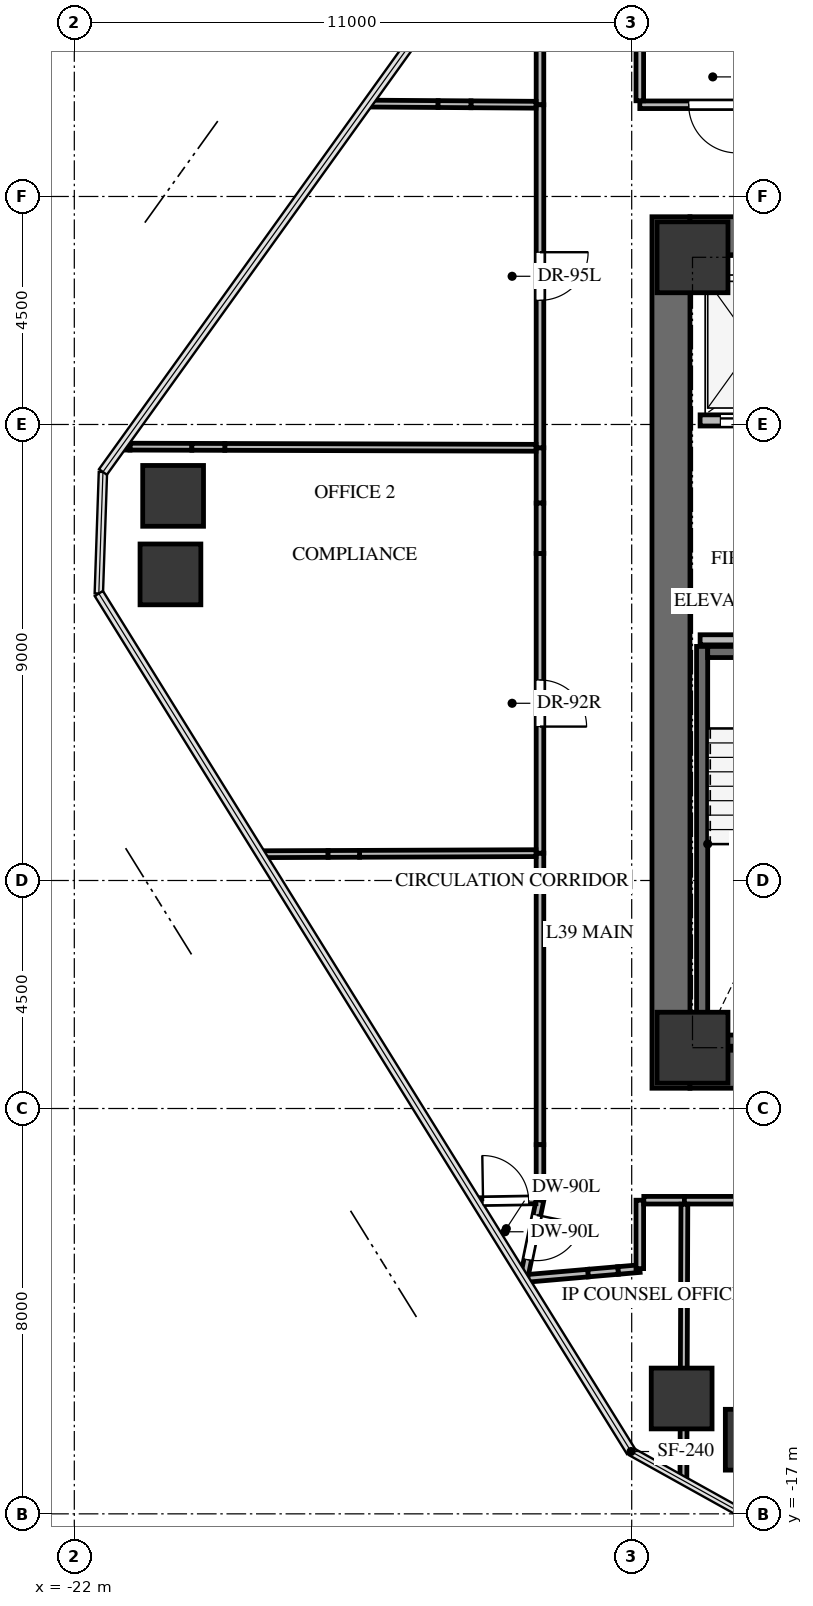
"""IFC4 building model, lengths in metres.
Left out: names, types, materials, properties, quantities, classifications, styles, units other than length and angle.
Written with IfcOpenShell. Run it as: python <this file> out.ifc"""

import sys

from ifc_helpers import new_model, si_unit, direction, frame, frame_2d, origin, origin_2d, place, context, subcontext, project, spatial, rectangle, extrude, source, transform, mapped, element, fill, save


model = new_model("IFC4")
c1 = context("Model", 3, precision=1e-05, world=origin(), true_north=direction((0.0, 1.0)))
c2 = subcontext(c1, "Body", "Model", "MODEL_VIEW")
j1 = project(units=[si_unit("LENGTHUNIT", "METRE"), si_unit("PLANEANGLEUNIT", "RADIAN")], contexts=[c1])
p1 = place(None, origin())
s1 = spatial("IfcSite", under=j1, at=p1, CompositionType="ELEMENT")
p2 = place(p1, origin())
s2 = spatial("IfcBuilding", under=s1, at=p2, CompositionType="ELEMENT")
p3 = place(p2, frame((0.0, 0.0, 143.1)))
s3 = spatial("IfcBuildingStorey", under=s2, at=p3, CompositionType="ELEMENT", Elevation=143.1)
p4 = place(p3, frame((-10.225, -8.6, 0.0), z_axis=(0.0, 0.0, 1.0), x_axis=(0.0, 1.0, 0.0)))
e1 = element("IfcWall", 1, at=p4, inside=s3, PredefinedType="SHEAR", context=c2, shape_type="SweptSolid", body=[
    extrude(rectangle(XDim=17.2, YDim=0.75, at=frame_2d((8.6, 0.0))), origin(), (0.0, 0.0, 1.0), 3.0),
])
p5 = place(p3, frame((-9.85, -8.225, 0.0), z_axis=(0.0, 0.0, 1.0), x_axis=(1.0, 0.0, 0.0)))
e2 = element("IfcWall", 2, at=p5, inside=s3, PredefinedType="SHEAR", context=c2, shape_type="SweptSolid", body=[
    extrude(rectangle(XDim=7.75, YDim=0.75, at=frame_2d((3.875, 0.0))), origin(), (0.0, 0.0, 1.0), 3.0),
])
p6 = place(p3, frame((-9.85, 8.225, 0.0), z_axis=(0.0, 0.0, 1.0), x_axis=(1.0, 0.0, 0.0)))
e3 = element("IfcWall", 3, at=p6, inside=s3, PredefinedType="SHEAR", context=c2, shape_type="SweptSolid", body=[
    extrude(rectangle(XDim=19.7, YDim=0.75, at=frame_2d((9.85, 0.0))), origin(), (0.0, 0.0, 1.0), 3.0),
])
p7 = place(p3, frame((-9.61, 0.12, -0.24), z_axis=(0.0, 0.0, 1.0), x_axis=(0.0, -1.0, 0.0)))
e4 = element("IfcWall", 4, at=p7, inside=s3, PredefinedType="SHEAR", context=c2, shape_type="SweptSolid", body=[
    extrude(rectangle(XDim=7.89, YDim=0.22, at=frame_2d((3.945, 0.0))), origin(), (0.0, 0.0, 1.0), 3.0),
])
for number, where, z_axis, x_axis in (
    (5, (-9.5, -7.66, -0.24), (0.0, 0.0, 1.0), (1.0, 0.0, 0.0)),
    (6, (-6.54, 0.01, -0.24), (0.0, 0.0, 1.0), (-1.0, 0.0, 0.0)),
):
    element("IfcWall", number, at=place(p3, frame(where, z_axis=z_axis, x_axis=x_axis)), inside=s3, PredefinedType="SHEAR", context=c2, shape_type="SweptSolid", body=[
        extrude(rectangle(XDim=2.96, YDim=0.22, at=frame_2d((1.48, 0.0))), origin(), (0.0, 0.0, 1.0), 3.0),
    ])
m1 = source(origin(), c2, "Body", "SweptSolid", [
    extrude(rectangle(XDim=1.4, YDim=1.4, at=origin_2d()), origin(), (0.0, 0.0, 1.0), 3.0),
])
for number, where, z_axis, x_axis in (
    (7, (-9.8, -7.8, -0.24), (0.0, 0.0, 1.0), (1.0, 0.0, 0.0)),
    (8, (-9.8, 7.8, -0.24), (0.0, 0.0, 1.0), (1.0, 0.0, 0.0)),
):
    element("IfcColumn", number, at=place(p3, frame(where, z_axis=z_axis, x_axis=x_axis)), inside=s3, PredefinedType="COLUMN", context=c2, shape_type="MappedRepresentation", body=[
        mapped(m1, transform((0.0, 0.0, 0.0), x_axis=(1.0, 0.0, 0.0), y_axis=(0.0, 1.0, 0.0), z_axis=(0.0, 0.0, 1.0), scale=1.0)),
    ])
m2 = source(origin(), c2, "Body", "SweptSolid", [
    extrude(rectangle(XDim=1.2, YDim=1.2, at=origin_2d()), origin(), (0.0, 0.0, 1.0), 3.0),
])
for number, where, z_axis, x_axis in (
    (9, (-10.014, -14.723, -0.24), (0.0, 0.0, 1.0), (1.0, 0.0, 0.0)),
    (10, (-20.103, 1.542, -0.24), (0.0, 0.0, 1.0), (1.0, 0.0, 0.0)),
    (11, (-20.05, 3.091, -0.24), (0.0, 0.0, 1.0), (1.0, 0.0, 0.0)),
    (12, (-8.552, -15.537, -0.24), (0.0, 0.0, 1.0), (1.0, 0.0, 0.0)),
):
    element("IfcColumn", number, at=place(p3, frame(where, z_axis=z_axis, x_axis=x_axis)), inside=s3, PredefinedType="COLUMN", context=c2, shape_type="MappedRepresentation", body=[
        mapped(m2, transform((0.0, 0.0, 0.0), x_axis=(1.0, 0.0, 0.0), y_axis=(0.0, 1.0, 0.0), z_axis=(0.0, 0.0, 1.0), scale=1.0)),
    ])
p8 = place(p3, frame((-9.65, 4.58, 0.0), z_axis=(0.0, 0.0, 1.0), x_axis=(1.0, 0.0, 0.0)))
e13 = element("IfcWall", 13, at=p8, inside=s3, PredefinedType="SOLIDWALL", context=c2, shape_type="SweptSolid", body=[
    extrude(rectangle(XDim=4.175, YDim=0.22, at=frame_2d((2.087, 0.0))), origin(), (0.0, 0.0, 1.0), 2.745),
])
p9 = place(p8, frame((0.4, 0.0, 0.0)))
e14 = element("IfcOpeningElement", 14, at=p9, cuts=e13, PredefinedType="OPENING", context=c2, shape_type="SweptSolid", body=[
    extrude(rectangle(XDim=1.2, YDim=2.15, at=frame_2d((0.6, 1.075))), frame((0.0, 0.12, 0.0), z_axis=(0.0, -1.0, 0.0), x_axis=(1.0, 0.0, 0.0)), (0.0, 0.0, 1.0), 0.24),
])
p10 = place(p8, frame((2.4, 0.0, 0.0)))
e15 = element("IfcOpeningElement", 15, at=p10, cuts=e13, PredefinedType="OPENING", context=c2, shape_type="SweptSolid", body=[
    extrude(rectangle(XDim=1.2, YDim=2.15, at=frame_2d((0.6, 1.075))), frame((0.0, 0.12, 0.0), z_axis=(0.0, -1.0, 0.0), x_axis=(1.0, 0.0, 0.0)), (0.0, 0.0, 1.0), 0.24),
])
p11 = place(p3, frame((-9.65, 0.25, 0.0), z_axis=(0.0, 0.0, 1.0), x_axis=(1.0, 0.0, 0.0)))
e16 = element("IfcWall", 16, at=p11, inside=s3, PredefinedType="SOLIDWALL", context=c2, shape_type="SweptSolid", body=[
    extrude(rectangle(XDim=4.27, YDim=0.2, at=frame_2d((2.135, 0.0))), origin(), (0.0, 0.0, 1.0), 2.745),
])
p12 = place(p3, frame((-7.96, 10.81, 0.0), z_axis=(0.0, 0.0, 1.0), x_axis=(-1.0, 0.0, 0.0)))
e17 = element("IfcWall", 17, at=p12, inside=s3, PredefinedType="PARTITIONING", context=c2, shape_type="SweptSolid", body=[
    extrude(rectangle(XDim=2.88, YDim=0.15, at=frame_2d((1.44, 0.0))), origin(), (0.0, 0.0, 1.0), 2.745),
])
p13 = place(p12, frame((0.965, 0.0, 0.0)))
e18 = element("IfcOpeningElement", 18, at=p13, cuts=e17, PredefinedType="OPENING", context=c2, shape_type="SweptSolid", body=[
    extrude(rectangle(XDim=0.95, YDim=2.1, at=frame_2d((0.475, 1.05))), frame((0.0, 0.085, 0.0), z_axis=(0.0, -1.0, 0.0), x_axis=(1.0, 0.0, 0.0)), (0.0, 0.0, 1.0), 0.17),
])
p14 = place(p3, frame((-10.84, 10.889, 0.0), z_axis=(0.0, 0.0, 1.0), x_axis=(0.0, 1.0, 0.0)))
e19 = element("IfcWall", 19, at=p14, inside=s3, PredefinedType="PARTITIONING", context=c2, shape_type="SweptSolid", body=[
    extrude(rectangle(XDim=1.192, YDim=0.15, at=frame_2d((0.596, 0.0))), origin(), (0.0, 0.0, 1.0), 2.745),
])
p15 = place(p3, frame((-12.81, 12.081, 0.0), z_axis=(0.0, 0.0, 1.0), x_axis=(0.0, -1.0, 0.0)))
e20 = element("IfcWall", 20, at=p15, inside=s3, PredefinedType="PARTITIONING", context=c2, shape_type="SweptSolid", body=[
    extrude(rectangle(XDim=1.271, YDim=0.15, at=frame_2d((0.635, 0.0))), origin(), (0.0, 0.0, 1.0), 2.745),
])
p16 = place(p3, frame((-13.129, -12.358, 0.0), z_axis=(0.0, 0.0, 1.0), x_axis=(0.996285787619, 0.086108242279, 0.0)))
e21 = element("IfcWall", 21, at=p16, inside=s3, PredefinedType="PARTITIONING", context=c2, shape_type="SweptSolid", body=[
    extrude(rectangle(XDim=1.273, YDim=0.15, at=frame_2d((0.636, 0.0))), origin(), (0.0, 0.0, 1.0), 2.745),
])
p17 = place(p3, frame((-11.27, -12.197, 0.0), z_axis=(0.0, 0.0, 1.0), x_axis=(0.996291394281, 0.086043347688, 0.0)))
e22 = element("IfcWall", 22, at=p17, inside=s3, PredefinedType="PARTITIONING", context=c2, shape_type="SweptSolid", body=[
    extrude(rectangle(XDim=0.431, YDim=0.15, at=frame_2d((0.216, 0.0))), origin(), (0.0, 0.0, 1.0), 2.745),
])
p18 = place(p3, frame((-11.861, -12.248, 0.0), z_axis=(0.0, 0.0, 1.0), x_axis=(0.996256019863, 0.086451968666, 0.0)))
e23 = element("IfcWall", 23, at=p18, inside=s3, PredefinedType="PARTITIONING", context=c2, shape_type="SweptSolid", body=[
    extrude(rectangle(XDim=0.593, YDim=0.15, at=frame_2d((0.296, 0.0))), origin(), (0.0, 0.0, 1.0), 2.08),
])
p19 = place(p3, frame((-12.81, -10.81, 0.0), z_axis=(0.0, 0.0, 1.0), x_axis=(-0.201786289638, -0.979429575474, 0.0)))
e24 = element("IfcWall", 24, at=p19, inside=s3, PredefinedType="PARTITIONING", context=c2, shape_type="SweptSolid", body=[
    extrude(rectangle(XDim=1.498, YDim=0.15, at=frame_2d((0.749, 0.0))), origin(), (0.0, 0.0, 1.0), 2.745),
])
p20 = place(p19, frame((0.299, 0.0, 0.0)))
e25 = element("IfcOpeningElement", 25, at=p20, cuts=e24, PredefinedType="OPENING", context=c2, shape_type="SweptSolid", body=[
    extrude(rectangle(XDim=0.9, YDim=2.05, at=frame_2d((0.45, 1.025))), frame((0.0, 0.085, 0.0), z_axis=(0.0, -1.0, 0.0), x_axis=(1.0, 0.0, 0.0)), (0.0, 0.0, 1.0), 0.17),
])
p21 = place(p3, frame((-10.84, -12.16, 0.0), z_axis=(0.0, 0.0, 1.0), x_axis=(0.0, 1.0, 0.0)))
e26 = element("IfcWall", 26, at=p21, inside=s3, PredefinedType="PARTITIONING", context=c2, shape_type="SweptSolid", body=[
    extrude(rectangle(XDim=1.35, YDim=0.15, at=frame_2d((0.675, 0.0))), origin(), (0.0, 0.0, 1.0), 2.745),
])
p22 = place(p3, frame((-10.761, -10.81, 0.0), z_axis=(0.0, 0.0, 1.0), x_axis=(1.0, 0.0, 0.0)))
e27 = element("IfcWall", 27, at=p22, inside=s3, PredefinedType="PARTITIONING", context=c2, shape_type="SweptSolid", body=[
    extrude(rectangle(XDim=0.801, YDim=0.15, at=frame_2d((0.4, 0.0))), origin(), (0.0, 0.0, 1.0), 2.745),
])
p23 = place(p3, frame((-9.96, -10.81, 0.0), z_axis=(0.0, 0.0, 1.0), x_axis=(1.0, 0.0, 0.0)))
e28 = element("IfcWall", 28, at=p23, inside=s3, PredefinedType="PARTITIONING", context=c2, shape_type="SweptSolid", body=[
    extrude(rectangle(XDim=3.625, YDim=0.15, at=frame_2d((1.813, 0.0))), origin(), (0.0, 0.0, 1.0), 1.912),
])
p24 = place(p3, frame((-12.81, -3.96, 0.0), z_axis=(0.0, 0.0, 1.0), x_axis=(0.0, -1.0, 0.0)))
e29 = element("IfcWall", 29, at=p24, inside=s3, PredefinedType="PARTITIONING", context=c2, shape_type="SweptSolid", body=[
    extrude(rectangle(XDim=5.754, YDim=0.15, at=frame_2d((2.877, 0.0))), origin(), (0.0, 0.0, 1.0), 2.08),
])
p25 = place(p3, frame((-12.81, -9.714, 0.0), z_axis=(0.0, 0.0, 1.0), x_axis=(0.0, -1.0, 0.0)))
e30 = element("IfcWall", 30, at=p25, inside=s3, PredefinedType="PARTITIONING", context=c2, shape_type="SweptSolid", body=[
    extrude(rectangle(XDim=1.004, YDim=0.15, at=frame_2d((0.502, 0.0))), origin(), (0.0, 0.0, 1.0), 2.08),
])
p26 = place(p3, frame((-12.81, 4.04, 0.0), z_axis=(0.0, 0.0, 1.0), x_axis=(0.0, -1.0, 0.0)))
e31 = element("IfcWall", 31, at=p26, inside=s3, PredefinedType="PARTITIONING", context=c2, shape_type="SweptSolid", body=[
    extrude(rectangle(XDim=1.092, YDim=0.15, at=frame_2d((0.546, 0.0))), origin(), (0.0, 0.0, 1.0), 2.745),
])
p27 = place(p3, frame((-12.81, 1.955, 0.0), z_axis=(0.0, 0.0, 1.0), x_axis=(0.0, -1.0, 0.0)))
e32 = element("IfcWall", 32, at=p27, inside=s3, PredefinedType="PARTITIONING", context=c2, shape_type="SweptSolid", body=[
    extrude(rectangle(XDim=5.915, YDim=0.15, at=frame_2d((2.958, 0.0))), origin(), (0.0, 0.0, 1.0), 2.745),
])
p28 = place(p27, frame((2.498, 0.0, 0.0)))
e33 = element("IfcOpeningElement", 33, at=p28, cuts=e32, PredefinedType="OPENING", context=c2, shape_type="SweptSolid", body=[
    extrude(rectangle(XDim=0.92, YDim=2.1, at=frame_2d((0.46, 1.05))), frame((0.0, 0.085, 0.0), z_axis=(0.0, -1.0, 0.0), x_axis=(1.0, 0.0, 0.0)), (0.0, 0.0, 1.0), 0.17),
])
p29 = place(p3, frame((-12.81, 2.948, 0.0), z_axis=(0.0, 0.0, 1.0), x_axis=(0.0, -1.0, 0.0)))
e34 = element("IfcWall", 34, at=p29, inside=s3, PredefinedType="PARTITIONING", context=c2, shape_type="SweptSolid", body=[
    extrude(rectangle(XDim=0.993, YDim=0.15, at=frame_2d((0.497, 0.0))), origin(), (0.0, 0.0, 1.0), 1.912),
])
p30 = place(p3, frame((-12.81, 10.81, 0.0), z_axis=(0.0, 0.0, 1.0), x_axis=(0.0, -1.0, 0.0)))
e35 = element("IfcWall", 35, at=p30, inside=s3, PredefinedType="PARTITIONING", context=c2, shape_type="SweptSolid", body=[
    extrude(rectangle(XDim=6.77, YDim=0.15, at=frame_2d((3.385, 0.0))), origin(), (0.0, 0.0, 1.0), 2.745),
])
p31 = place(p30, frame((2.91, 0.0, 0.0)))
e36 = element("IfcOpeningElement", 36, at=p31, cuts=e35, PredefinedType="OPENING", context=c2, shape_type="SweptSolid", body=[
    extrude(rectangle(XDim=0.95, YDim=2.1, at=frame_2d((0.475, 1.05))), frame((0.0, 0.085, 0.0), z_axis=(0.0, -1.0, 0.0), x_axis=(1.0, 0.0, 0.0)), (0.0, 0.0, 1.0), 0.17),
])
p32 = place(p3, frame((-12.889, 10.811, 0.0), z_axis=(0.0, 0.0, 1.0), x_axis=(-0.999976553189, 0.00684785161, 0.0)))
e37 = element("IfcWall", 37, at=p32, inside=s3, PredefinedType="PARTITIONING", context=c2, shape_type="SweptSolid", body=[
    extrude(rectangle(XDim=1.283, YDim=0.135, at=frame_2d((0.642, 0.0))), origin(), (0.0, 0.0, 1.0), 2.745),
])
p33 = place(p3, frame((-14.821, 10.824, 0.0), z_axis=(0.0, 0.0, 1.0), x_axis=(-0.999976577186, 0.006844346527, 0.0)))
e38 = element("IfcWall", 38, at=p33, inside=s3, PredefinedType="PARTITIONING", context=c2, shape_type="SweptSolid", body=[
    extrude(rectangle(XDim=1.391, YDim=0.135, at=frame_2d((0.696, 0.0))), origin(), (0.0, 0.0, 1.0), 2.745),
])
p34 = place(p3, frame((-14.172, 10.819, 0.0), z_axis=(0.0, 0.0, 1.0), x_axis=(-0.999977036192, 0.006776952806, 0.0)))
e39 = element("IfcWall", 39, at=p34, inside=s3, PredefinedType="PARTITIONING", context=c2, shape_type="SweptSolid", body=[
    extrude(rectangle(XDim=0.648, YDim=0.135, at=frame_2d((0.324, 0.0))), origin(), (0.0, 0.0, 1.0), 2.08),
])
p35 = place(p3, frame((-9.96, -10.889, 0.0), z_axis=(0.0, 0.0, 1.0), x_axis=(-0.003528457908, -0.999993774973, 0.0)))
e40 = element("IfcWall", 40, at=p35, inside=s3, PredefinedType="PARTITIONING", context=c2, shape_type="SweptSolid", body=[
    extrude(rectangle(XDim=3.39, YDim=0.135, at=frame_2d((1.695, 0.0))), origin(), (0.0, 0.0, 1.0), 1.912),
])
p36 = place(p3, frame((-9.975, -15.048, 0.0), z_axis=(0.0, 0.0, 1.0), x_axis=(-0.003576784349, -0.999993603286, 0.0)))
e41 = element("IfcWall", 41, at=p36, inside=s3, PredefinedType="PARTITIONING", context=c2, shape_type="SweptSolid", body=[
    extrude(rectangle(XDim=1.297, YDim=0.135, at=frame_2d((0.648, 0.0))), origin(), (0.0, 0.0, 1.0), 2.745),
])
p37 = place(p3, frame((-9.972, -14.279, 0.0), z_axis=(0.0, 0.0, 1.0), x_axis=(-0.003494260751, -0.999993895052, 0.0)))
e42 = element("IfcWall", 42, at=p37, inside=s3, PredefinedType="PARTITIONING", context=c2, shape_type="SweptSolid", body=[
    extrude(rectangle(XDim=0.769, YDim=0.135, at=frame_2d((0.384, 0.0))), origin(), (0.0, 0.0, 1.0), 1.577),
])
p38 = place(p3, frame((-14.076, -10.831, 0.0), z_axis=(0.0, 0.0, 1.0), x_axis=(0.999860796611, 0.016684945308, 0.0)))
e43 = element("IfcWall", 43, at=p38, inside=s3, PredefinedType="PARTITIONING", context=c2, shape_type="SweptSolid", body=[
    extrude(rectangle(XDim=1.185, YDim=0.135, at=frame_2d((0.593, 0.0))), origin(), (0.0, 0.0, 1.0), 2.745),
])
p39 = place(p38, frame((0.143, 0.0, 0.0)))
e44 = element("IfcOpeningElement", 44, at=p39, cuts=e43, PredefinedType="OPENING", context=c2, shape_type="SweptSolid", body=[
    extrude(rectangle(XDim=0.9, YDim=2.05, at=frame_2d((0.45, 1.025))), frame((0.0, 0.078, 0.0), z_axis=(0.0, -1.0, 0.0), x_axis=(1.0, 0.0, 0.0)), (0.0, 0.0, 1.0), 0.155),
])
p40 = place(p3, frame((-18.325, -3.981, 0.0), z_axis=(0.0, 0.0, 1.0), x_axis=(0.999992603632, 0.003846125399, 0.0)))
e45 = element("IfcWall", 45, at=p40, inside=s3, PredefinedType="PARTITIONING", context=c2, shape_type="SweptSolid", body=[
    extrude(rectangle(XDim=1.333, YDim=0.135, at=frame_2d((0.667, 0.0))), origin(), (0.0, 0.0, 1.0), 2.745),
])
p41 = place(p3, frame((-16.371, -3.974, 0.0), z_axis=(0.0, 0.0, 1.0), x_axis=(0.999992563123, 0.003856643361, 0.0)))
e46 = element("IfcWall", 46, at=p41, inside=s3, PredefinedType="PARTITIONING", context=c2, shape_type="SweptSolid", body=[
    extrude(rectangle(XDim=3.482, YDim=0.135, at=frame_2d((1.741, 0.0))), origin(), (0.0, 0.0, 1.0), 2.745),
])
p42 = place(p3, frame((-16.992, -3.976, 0.0), z_axis=(0.0, 0.0, 1.0), x_axis=(0.999992274426, 0.003930787242, 0.0)))
e47 = element("IfcWall", 47, at=p42, inside=s3, PredefinedType="PARTITIONING", context=c2, shape_type="SweptSolid", body=[
    extrude(rectangle(XDim=0.621, YDim=0.135, at=frame_2d((0.311, 0.0))), origin(), (0.0, 0.0, 1.0), 2.08),
])
p43 = place(p3, frame((-20.901, 4.063, 0.0), z_axis=(0.0, 0.0, 1.0), x_axis=(0.999996083157, -0.002798869485, 0.0)))
e48 = element("IfcWall", 48, at=p43, inside=s3, PredefinedType="PARTITIONING", context=c2, shape_type="SweptSolid", body=[
    extrude(rectangle(XDim=1.221, YDim=0.135, at=frame_2d((0.611, 0.0))), origin(), (0.0, 0.0, 1.0), 1.577),
])
p44 = place(p3, frame((-19.03, 4.058, 0.0), z_axis=(0.0, 0.0, 1.0), x_axis=(0.999996016453, -0.002822601462, 0.0)))
e49 = element("IfcWall", 49, at=p44, inside=s3, PredefinedType="PARTITIONING", context=c2, shape_type="SweptSolid", body=[
    extrude(rectangle(XDim=6.141, YDim=0.135, at=frame_2d((3.071, 0.0))), origin(), (0.0, 0.0, 1.0), 2.745),
])
p45 = place(p3, frame((-21.075, 4.063, 0.0), z_axis=(0.0, 0.0, 1.0), x_axis=(0.999996065873, -0.002805038053, 0.0)))
e50 = element("IfcWall", 50, at=p45, inside=s3, PredefinedType="PARTITIONING", context=c2, shape_type="SweptSolid", body=[
    extrude(rectangle(XDim=0.174, YDim=0.135, at=frame_2d((0.087, 0.0))), origin(), (0.0, 0.0, 1.0), 1.577),
])
p46 = place(p3, frame((-19.68, 4.059, 0.0), z_axis=(0.0, 0.0, 1.0), x_axis=(0.999996545211, -0.002628605263, 0.0)))
e51 = element("IfcWall", 51, at=p46, inside=s3, PredefinedType="PARTITIONING", context=c2, shape_type="SweptSolid", body=[
    extrude(rectangle(XDim=0.65, YDim=0.135, at=frame_2d((0.325, 0.0))), origin(), (0.0, 0.0, 1.0), 2.08),
])
m3 = source(origin(), c2, "Body", "SweptSolid", [
    extrude(rectangle(XDim=1.2, YDim=2.15, at=frame_2d((0.6, 1.075))), frame((0.0, 0.025, 0.0), z_axis=(0.0, -1.0, 0.0), x_axis=(1.0, 0.0, 0.0)), (0.0, 0.0, 1.0), 0.05),
])
p47 = place(p9, origin())
e52 = element("IfcDoor", 52, at=p47, inside=s3, OperationType="DOUBLE_DOOR_SLIDING", PredefinedType="DOOR", context=c2, shape_type="MappedRepresentation", body=[
    mapped(m3, transform((0.0, 0.0, 0.0), x_axis=(1.0, 0.0, 0.0), y_axis=(0.0, 1.0, 0.0), z_axis=(0.0, 0.0, 1.0), scale=1.0)),
])
fill(e14, e52)
m4 = source(origin(), c2, "Body", "SweptSolid", [
    extrude(rectangle(XDim=0.95, YDim=2.1, at=frame_2d((0.475, 1.05))), frame((0.0, 0.025, 0.0), z_axis=(0.0, -1.0, 0.0), x_axis=(1.0, 0.0, 0.0)), (0.0, 0.0, 1.0), 0.05),
])
p48 = place(p13, origin())
e53 = element("IfcDoor", 53, at=p48, inside=s3, OperationType="SINGLE_SWING_LEFT", PredefinedType="DOOR", context=c2, shape_type="MappedRepresentation", body=[
    mapped(m4, transform((0.0, 0.0, 0.0), x_axis=(1.0, 0.0, 0.0), y_axis=(0.0, 1.0, 0.0), z_axis=(0.0, 0.0, 1.0), scale=1.0)),
])
fill(e18, e53)
m5 = source(origin(), c2, "Body", "SweptSolid", [
    extrude(rectangle(XDim=0.9, YDim=2.05, at=frame_2d((0.45, 1.025))), frame((0.0, 0.025, 0.0), z_axis=(0.0, -1.0, 0.0), x_axis=(1.0, 0.0, 0.0)), (0.0, 0.0, 1.0), 0.05),
])
p49 = place(p20, origin())
e54 = element("IfcDoor", 54, at=p49, inside=s3, OperationType="SINGLE_SWING_LEFT", PredefinedType="DOOR", context=c2, shape_type="MappedRepresentation", body=[
    mapped(m5, transform((0.0, 0.0, 0.0), x_axis=(1.0, 0.0, 0.0), y_axis=(0.0, 1.0, 0.0), z_axis=(0.0, 0.0, 1.0), scale=1.0)),
])
fill(e25, e54)
m6 = source(origin(), c2, "Body", "SweptSolid", [
    extrude(rectangle(XDim=0.92, YDim=2.1, at=frame_2d((0.46, 1.05))), frame((0.0, 0.025, 0.0), z_axis=(0.0, -1.0, 0.0), x_axis=(1.0, 0.0, 0.0)), (0.0, 0.0, 1.0), 0.05),
])
p50 = place(p28, origin())
e55 = element("IfcDoor", 55, at=p50, inside=s3, OperationType="SINGLE_SWING_RIGHT", PredefinedType="DOOR", context=c2, shape_type="MappedRepresentation", body=[
    mapped(m6, transform((0.0, 0.0, 0.0), x_axis=(1.0, 0.0, 0.0), y_axis=(0.0, 1.0, 0.0), z_axis=(0.0, 0.0, 1.0), scale=1.0)),
])
fill(e33, e55)
p51 = place(p31, origin())
e56 = element("IfcDoor", 56, at=p51, inside=s3, OperationType="SINGLE_SWING_LEFT", PredefinedType="DOOR", context=c2, shape_type="MappedRepresentation", body=[
    mapped(m4, transform((0.0, 0.0, 0.0), x_axis=(1.0, 0.0, 0.0), y_axis=(0.0, 1.0, 0.0), z_axis=(0.0, 0.0, 1.0), scale=1.0)),
])
fill(e36, e56)
p52 = place(p39, origin())
e57 = element("IfcDoor", 57, at=p52, inside=s3, OperationType="SINGLE_SWING_LEFT", PredefinedType="DOOR", context=c2, shape_type="MappedRepresentation", body=[
    mapped(m5, transform((0.0, 0.0, 0.0), x_axis=(1.0, 0.0, 0.0), y_axis=(0.0, 1.0, 0.0), z_axis=(0.0, 0.0, 1.0), scale=1.0)),
])
fill(e44, e57)
save(model, sys.argv[1])
